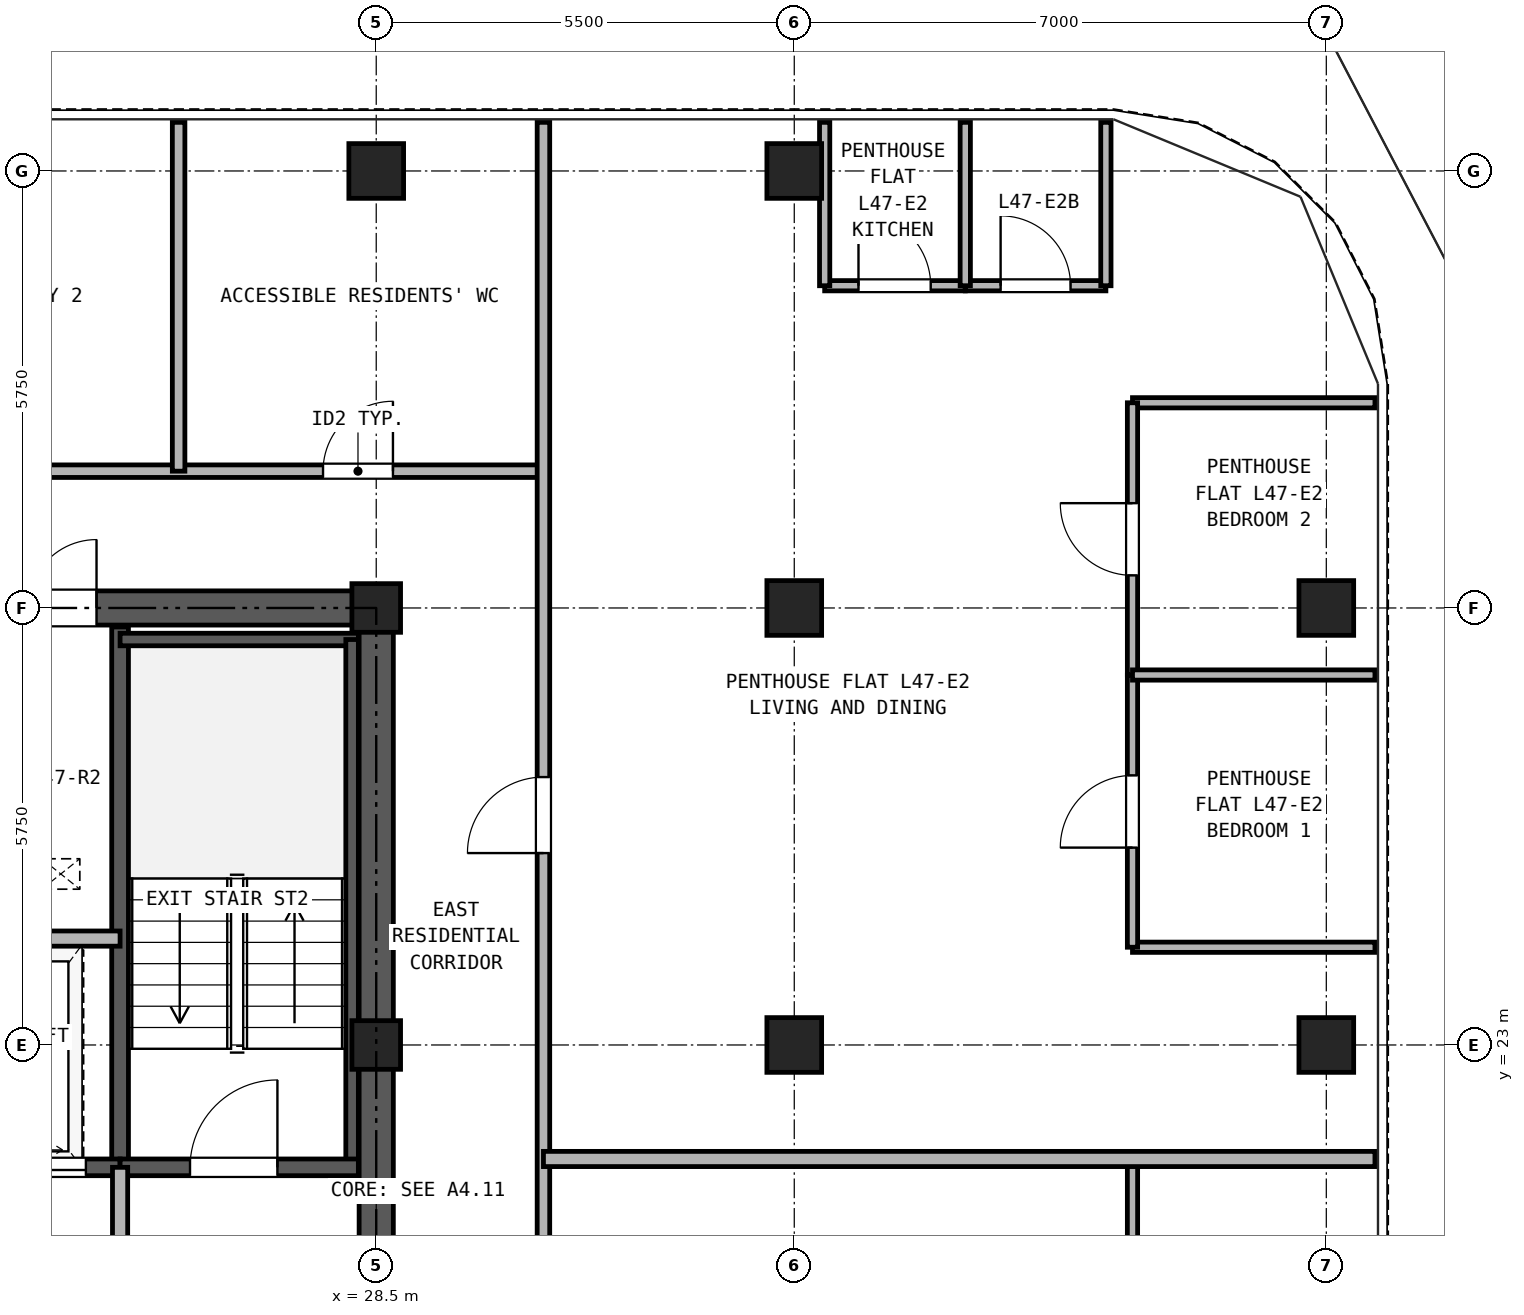
"""IFC4 building model, lengths in metres.
Left out: names, types, materials, properties, quantities, classifications, styles, units other than length and angle.
Written with IfcOpenShell. Run it as: python <this file> out.ifc"""

import sys

from ifc_helpers import new_model, si_unit, direction, frame, frame_2d, origin, origin_2d, place, context, subcontext, project, spatial, rectangle, hollow_rectangle, extrude, source, transform, mapped, element, fill, save


model = new_model("IFC4")
c1 = context("Model", 3, precision=1e-05, world=origin(), true_north=direction((0.0, 1.0)))
c2 = subcontext(c1, "Body", "Model", "MODEL_VIEW")
j1 = project(units=[si_unit("LENGTHUNIT", "METRE"), si_unit("PLANEANGLEUNIT", "RADIAN")], contexts=[c1])
p1 = place(None, origin())
s1 = spatial("IfcSite", under=j1, at=p1, CompositionType="ELEMENT")
p2 = place(p1, origin())
s2 = spatial("IfcBuilding", under=s1, at=p2, CompositionType="ELEMENT")
p3 = place(p2, frame((0.0, 0.0, 168.9)))
s3 = spatial("IfcBuildingStorey", under=s2, at=p3, CompositionType="ELEMENT", Elevation=168.9)
m1 = source(origin(), c2, "Body", "SweptSolid", [
    extrude(hollow_rectangle(XDim=0.72, YDim=0.72, WallThickness=0.04, at=origin_2d()), origin(), (0.0, 0.0, 1.0), 2.95),
])
for number, where, z_axis, x_axis in (
    (1, (28.5, 34.5, 0.0), (0.0, 0.0, 1.0), (1.0, 0.0, 0.0)),
    (2, (34.0, 34.5, 0.0), (0.0, 0.0, 1.0), (1.0, 0.0, 0.0)),
    (3, (41.0, 23.0, 0.0), (0.0, 0.0, 1.0), (1.0, 0.0, 0.0)),
    (4, (41.0, 28.75, 0.0), (0.0, 0.0, 1.0), (1.0, 0.0, 0.0)),
):
    element("IfcColumn", number, at=place(p3, frame(where, z_axis=z_axis, x_axis=x_axis)), inside=s3, PredefinedType="COLUMN", context=c2, shape_type="MappedRepresentation", body=[
        mapped(m1, transform((0.0, 0.0, 0.0), x_axis=(1.0, 0.0, 0.0), y_axis=(0.0, 1.0, 0.0), z_axis=(0.0, 0.0, 1.0), scale=1.0)),
    ])
m2 = source(origin(), c2, "Body", "SweptSolid", [
    extrude(hollow_rectangle(XDim=0.64, YDim=0.64, WallThickness=0.035, at=origin_2d()), origin(), (0.0, 0.0, 1.0), 2.95),
])
for number, where, z_axis, x_axis in (
    (5, (28.5, 23.0, 0.0), (0.0, 0.0, 1.0), (1.0, 0.0, 0.0)),
    (6, (28.5, 28.75, 0.0), (0.0, 0.0, 1.0), (1.0, 0.0, 0.0)),
):
    element("IfcColumn", number, at=place(p3, frame(where, z_axis=z_axis, x_axis=x_axis)), inside=s3, PredefinedType="COLUMN", context=c2, shape_type="MappedRepresentation", body=[
        mapped(m2, transform((0.0, 0.0, 0.0), x_axis=(1.0, 0.0, 0.0), y_axis=(0.0, 1.0, 0.0), z_axis=(0.0, 0.0, 1.0), scale=1.0)),
    ])
for number, where, z_axis, x_axis in (
    (7, (34.0, 23.0, 0.0), (0.0, 0.0, 1.0), (1.0, 0.0, 0.0)),
    (8, (34.0, 28.75, 0.0), (0.0, 0.0, 1.0), (1.0, 0.0, 0.0)),
):
    element("IfcColumn", number, at=place(p3, frame(where, z_axis=z_axis, x_axis=x_axis)), inside=s3, PredefinedType="COLUMN", context=c2, shape_type="MappedRepresentation", body=[
        mapped(m1, transform((0.0, 0.0, 0.0), x_axis=(1.0, 0.0, 0.0), y_axis=(0.0, 1.0, 0.0), z_axis=(0.0, 0.0, 1.0), scale=1.0)),
    ])
p4 = place(p3, frame((18.275, 28.75, 0.0), z_axis=(0.0, 0.0, 1.0), x_axis=(1.0, 0.0, 0.0)))
e9 = element("IfcWall", 9, at=p4, inside=s3, PredefinedType="SHEAR", context=c2, shape_type="SweptSolid", body=[
    extrude(rectangle(XDim=10.45, YDim=0.45, at=frame_2d((5.225, 0.0))), origin(), (0.0, 0.0, 1.0), 2.95),
])
p5 = place(p4, frame((4.105, 0.0, 0.0)))
e10 = element("IfcOpeningElement", 10, at=p5, cuts=e9, PredefinedType="OPENING", context=c2, shape_type="SweptSolid", body=[
    extrude(rectangle(XDim=0.9, YDim=2.05, at=frame_2d((0.45, 1.025))), frame((0.0, 0.235, 0.0), z_axis=(0.0, -1.0, 0.0), x_axis=(1.0, 0.0, 0.0)), (0.0, 0.0, 1.0), 0.47),
])
p6 = place(p4, frame((5.645, 0.0, 0.0)))
e11 = element("IfcOpeningElement", 11, at=p6, cuts=e9, PredefinedType="OPENING", context=c2, shape_type="SweptSolid", body=[
    extrude(rectangle(XDim=0.9, YDim=2.05, at=frame_2d((0.45, 1.025))), frame((0.0, 0.235, 0.0), z_axis=(0.0, -1.0, 0.0), x_axis=(1.0, 0.0, 0.0)), (0.0, 0.0, 1.0), 0.47),
])
p7 = place(p3, frame((28.5, 11.725, 0.0), z_axis=(0.0, 0.0, 1.0), x_axis=(0.0, 1.0, 0.0)))
e12 = element("IfcWall", 12, at=p7, inside=s3, PredefinedType="SHEAR", context=c2, shape_type="SweptSolid", body=[
    extrude(rectangle(XDim=16.8, YDim=0.45, at=frame_2d((8.4, 0.0))), origin(), (0.0, 0.0, 1.0), 2.95),
])
p8 = place(p7, frame((7.425, 0.0, 0.0)))
e13 = element("IfcOpeningElement", 13, at=p8, cuts=e12, PredefinedType="OPENING", context=c2, shape_type="SweptSolid", body=[
    extrude(rectangle(XDim=1.15, YDim=2.2, at=frame_2d((0.575, 1.1))), frame((0.0, 0.235, 0.0), z_axis=(0.0, -1.0, 0.0), x_axis=(1.0, 0.0, 0.0)), (0.0, 0.0, 1.0), 0.47),
])
p9 = place(p3, frame((25.13, 21.39, 0.0), z_axis=(0.0, 0.0, 1.0), x_axis=(0.0, 1.0, 0.0)))
e14 = element("IfcWall", 14, at=p9, inside=s3, PredefinedType="SOLIDWALL", context=c2, shape_type="SweptSolid", body=[
    extrude(rectangle(XDim=7.11, YDim=0.22, at=frame_2d((3.555, 0.0))), origin(), (0.0, 0.0, 1.0), 2.95),
])
p10 = place(p3, frame((25.13, 28.335, 0.0), z_axis=(0.0, 0.0, 1.0), x_axis=(1.0, 0.0, 0.0)))
e15 = element("IfcWall", 15, at=p10, inside=s3, PredefinedType="PARTITIONING", context=c2, shape_type="SweptSolid", body=[
    extrude(rectangle(XDim=3.135, YDim=0.165, at=frame_2d((1.567, 0.0))), origin(), (0.0, 0.0, 1.0), 2.95),
])
p11 = place(p3, frame((28.183, 21.39, 0.0), z_axis=(0.0, 0.0, 1.0), x_axis=(0.0, 1.0, 0.0)))
e16 = element("IfcWall", 16, at=p11, inside=s3, PredefinedType="PARTITIONING", context=c2, shape_type="SweptSolid", body=[
    extrude(rectangle(XDim=6.945, YDim=0.165, at=frame_2d((3.473, 0.0))), origin(), (0.0, 0.0, 1.0), 2.95),
])
p12 = place(p3, frame((18.735, 21.39, 0.0), z_axis=(0.0, 0.0, 1.0), x_axis=(1.0, 0.0, 0.0)))
e17 = element("IfcWall", 17, at=p12, inside=s3, PredefinedType="SOLIDWALL", context=c2, shape_type="SweptSolid", body=[
    extrude(rectangle(XDim=6.395, YDim=0.22, at=frame_2d((3.197, 0.0))), origin(), (0.0, 0.0, 1.0), 2.95),
])
p13 = place(p12, frame((1.115, 0.0, 0.0)))
e18 = element("IfcOpeningElement", 18, at=p13, cuts=e17, PredefinedType="OPENING", context=c2, shape_type="SweptSolid", body=[
    extrude(rectangle(XDim=1.15, YDim=2.2, at=frame_2d((0.575, 1.1))), frame((0.0, 0.12, 0.0), z_axis=(0.0, -1.0, 0.0), x_axis=(1.0, 0.0, 0.0)), (0.0, 0.0, 1.0), 0.24),
])
p14 = place(p12, frame((4.845, 0.0, 0.0)))
e19 = element("IfcOpeningElement", 19, at=p14, cuts=e17, PredefinedType="OPENING", context=c2, shape_type="SweptSolid", body=[
    extrude(rectangle(XDim=1.1, YDim=2.25, at=frame_2d((0.55, 1.125))), frame((0.0, 0.12, 0.0), z_axis=(0.0, -1.0, 0.0), x_axis=(1.0, 0.0, 0.0)), (0.0, 0.0, 1.0), 0.24),
])
p15 = place(p3, frame((25.13, 21.39, 0.0), z_axis=(0.0, 0.0, 1.0), x_axis=(1.0, 0.0, 0.0)))
e20 = element("IfcWall", 20, at=p15, inside=s3, PredefinedType="SOLIDWALL", context=c2, shape_type="SweptSolid", body=[
    extrude(rectangle(XDim=3.135, YDim=0.22, at=frame_2d((1.567, 0.0))), origin(), (0.0, 0.0, 1.0), 2.95),
])
p16 = place(p15, frame((0.92, 0.0, 0.0)))
e21 = element("IfcOpeningElement", 21, at=p16, cuts=e20, PredefinedType="OPENING", context=c2, shape_type="SweptSolid", body=[
    extrude(rectangle(XDim=1.15, YDim=2.2, at=frame_2d((0.575, 1.1))), frame((0.0, 0.12, 0.0), z_axis=(0.0, -1.0, 0.0), x_axis=(1.0, 0.0, 0.0)), (0.0, 0.0, 1.0), 0.24),
])
p17 = place(p3, frame((22.11, 24.4, 0.0), z_axis=(0.0, 0.0, 1.0), x_axis=(1.0, 0.0, 0.0)))
e22 = element("IfcWall", 22, at=p17, inside=s3, PredefinedType="PARTITIONING", context=c2, shape_type="SweptSolid", body=[
    extrude(rectangle(XDim=3.02, YDim=0.2, at=frame_2d((1.51, 0.0))), origin(), (0.0, 0.0, 1.0), 2.95),
])
p18 = place(p3, frame((25.13, 18.0, 0.0), z_axis=(0.0, 0.0, 1.0), x_axis=(0.0, 1.0, 0.0)))
e23 = element("IfcWall", 23, at=p18, inside=s3, PredefinedType="PARTITIONING", context=c2, shape_type="SweptSolid", body=[
    extrude(rectangle(XDim=3.39, YDim=0.2, at=frame_2d((1.695, 0.0))), origin(), (0.0, 0.0, 1.0), 2.95),
])
p19 = place(p18, frame((1.1, 0.0, 0.0)))
e24 = element("IfcOpeningElement", 24, at=p19, cuts=e23, PredefinedType="OPENING", context=c2, shape_type="SweptSolid", body=[
    extrude(rectangle(XDim=1.15, YDim=2.2, at=frame_2d((0.575, 1.1))), frame((0.0, 0.11, 0.0), z_axis=(0.0, -1.0, 0.0), x_axis=(1.0, 0.0, 0.0)), (0.0, 0.0, 1.0), 0.22),
])
p20 = place(p3, frame((16.3, 30.55, 0.0), z_axis=(0.0, 0.0, 1.0), x_axis=(1.0, 0.0, 0.0)))
e25 = element("IfcWall", 25, at=p20, inside=s3, PredefinedType="PARTITIONING", context=c2, shape_type="SweptSolid", body=[
    extrude(rectangle(XDim=14.4, YDim=0.165, at=frame_2d((7.2, 0.0))), origin(), (0.0, 0.0, 1.0), 2.95),
])
p21 = place(p20, frame((2.1, 0.0, 0.0)))
e26 = element("IfcOpeningElement", 26, at=p21, cuts=e25, PredefinedType="OPENING", context=c2, shape_type="SweptSolid", body=[
    extrude(rectangle(XDim=0.95, YDim=2.15, at=frame_2d((0.475, 1.075))), frame((0.0, 0.093, 0.0), z_axis=(0.0, -1.0, 0.0), x_axis=(1.0, 0.0, 0.0)), (0.0, 0.0, 1.0), 0.185),
])
p22 = place(p20, frame((6.9, 0.0, 0.0)))
e27 = element("IfcOpeningElement", 27, at=p22, cuts=e25, PredefinedType="OPENING", context=c2, shape_type="SweptSolid", body=[
    extrude(rectangle(XDim=0.95, YDim=2.15, at=frame_2d((0.475, 1.075))), frame((0.0, 0.093, 0.0), z_axis=(0.0, -1.0, 0.0), x_axis=(1.0, 0.0, 0.0)), (0.0, 0.0, 1.0), 0.185),
])
p23 = place(p20, frame((11.5, 0.0, 0.0)))
e28 = element("IfcOpeningElement", 28, at=p23, cuts=e25, PredefinedType="OPENING", context=c2, shape_type="SweptSolid", body=[
    extrude(rectangle(XDim=0.92, YDim=2.1, at=frame_2d((0.46, 1.05))), frame((0.0, 0.093, 0.0), z_axis=(0.0, -1.0, 0.0), x_axis=(1.0, 0.0, 0.0)), (0.0, 0.0, 1.0), 0.185),
])
p24 = place(p3, frame((30.7, 11.45, 0.0), z_axis=(0.0, 0.0, 1.0), x_axis=(0.0, 1.0, 0.0)))
e29 = element("IfcWall", 29, at=p24, inside=s3, PredefinedType="PARTITIONING", context=c2, shape_type="SweptSolid", body=[
    extrude(rectangle(XDim=23.69, YDim=0.165, at=frame_2d((11.845, 0.0))), origin(), (0.0, 0.0, 1.0), 2.95),
])
p25 = place(p24, frame((4.525, 0.0, 0.0)))
e30 = element("IfcOpeningElement", 30, at=p25, cuts=e29, PredefinedType="OPENING", context=c2, shape_type="SweptSolid", body=[
    extrude(rectangle(XDim=1.0, YDim=2.15, at=frame_2d((0.5, 1.075))), frame((0.0, 0.093, 0.0), z_axis=(0.0, -1.0, 0.0), x_axis=(1.0, 0.0, 0.0)), (0.0, 0.0, 1.0), 0.185),
])
p26 = place(p24, frame((14.075, 0.0, 0.0)))
e31 = element("IfcOpeningElement", 31, at=p26, cuts=e29, PredefinedType="OPENING", context=c2, shape_type="SweptSolid", body=[
    extrude(rectangle(XDim=1.0, YDim=2.15, at=frame_2d((0.5, 1.075))), frame((0.0, 0.093, 0.0), z_axis=(0.0, -1.0, 0.0), x_axis=(1.0, 0.0, 0.0)), (0.0, 0.0, 1.0), 0.185),
])
p27 = place(p3, frame((38.45, 18.1, 0.0), z_axis=(0.0, 0.0, 1.0), x_axis=(0.0, 1.0, 0.0)))
e32 = element("IfcWall", 32, at=p27, inside=s3, PredefinedType="PARTITIONING", context=c2, shape_type="SweptSolid", body=[
    extrude(rectangle(XDim=3.4, YDim=0.135, at=frame_2d((1.7, 0.0))), origin(), (0.0, 0.0, 1.0), 2.95),
])
p28 = place(p27, frame((1.22, 0.0, 0.0)))
e33 = element("IfcOpeningElement", 33, at=p28, cuts=e32, PredefinedType="OPENING", context=c2, shape_type="SweptSolid", body=[
    extrude(rectangle(XDim=0.95, YDim=2.15, at=frame_2d((0.475, 1.075))), frame((0.0, 0.077, 0.0), z_axis=(0.0, -1.0, 0.0), x_axis=(1.0, 0.0, 0.0)), (0.0, 0.0, 1.0), 0.155),
])
p29 = place(p3, frame((30.7, 21.5, 0.0), z_axis=(0.0, 0.0, 1.0), x_axis=(1.0, 0.0, 0.0)))
e34 = element("IfcWall", 34, at=p29, inside=s3, PredefinedType="PARTITIONING", context=c2, shape_type="SweptSolid", body=[
    extrude(rectangle(XDim=10.94, YDim=0.2, at=frame_2d((5.47, 0.0))), origin(), (0.0, 0.0, 1.0), 2.95),
])
p30 = place(p3, frame((34.4, 32.99, 0.0), z_axis=(0.0, 0.0, 1.0), x_axis=(1.0, 0.0, 0.0)))
e35 = element("IfcWall", 35, at=p30, inside=s3, PredefinedType="PARTITIONING", context=c2, shape_type="SweptSolid", body=[
    extrude(rectangle(XDim=1.85, YDim=0.135, at=frame_2d((0.925, 0.0))), origin(), (0.0, 0.0, 1.0), 2.95),
])
p31 = place(p30, frame((0.445, 0.0, 0.0)))
e36 = element("IfcOpeningElement", 36, at=p31, cuts=e35, PredefinedType="OPENING", context=c2, shape_type="SweptSolid", body=[
    extrude(rectangle(XDim=0.95, YDim=2.15, at=frame_2d((0.475, 1.075))), frame((0.0, 0.077, 0.0), z_axis=(0.0, -1.0, 0.0), x_axis=(1.0, 0.0, 0.0)), (0.0, 0.0, 1.0), 0.155),
])
p32 = place(p3, frame((36.25, 32.99, 0.0), z_axis=(0.0, 0.0, 1.0), x_axis=(1.0, 0.0, 0.0)))
e37 = element("IfcWall", 37, at=p32, inside=s3, PredefinedType="PARTITIONING", context=c2, shape_type="SweptSolid", body=[
    extrude(rectangle(XDim=1.85, YDim=0.135, at=frame_2d((0.925, 0.0))), origin(), (0.0, 0.0, 1.0), 2.95),
])
p33 = place(p32, frame((0.465, 0.0, 0.0)))
e38 = element("IfcOpeningElement", 38, at=p33, cuts=e37, PredefinedType="OPENING", context=c2, shape_type="SweptSolid", body=[
    extrude(rectangle(XDim=0.92, YDim=2.1, at=frame_2d((0.46, 1.05))), frame((0.0, 0.077, 0.0), z_axis=(0.0, -1.0, 0.0), x_axis=(1.0, 0.0, 0.0)), (0.0, 0.0, 1.0), 0.155),
])
for number, where, z_axis, x_axis in (
    (39, (34.4, 32.99, 0.0), (0.0, 0.0, 1.0), (0.0, 1.0, 0.0)),
    (40, (36.25, 32.99, 0.0), (0.0, 0.0, 1.0), (0.0, 1.0, 0.0)),
    (41, (38.1, 32.99, 0.0), (0.0, 0.0, 1.0), (0.0, 1.0, 0.0)),
):
    element("IfcWall", number, at=place(p3, frame(where, z_axis=z_axis, x_axis=x_axis)), inside=s3, PredefinedType="PARTITIONING", context=c2, shape_type="SweptSolid", body=[
        extrude(rectangle(XDim=2.15, YDim=0.135, at=frame_2d((1.075, 0.0))), origin(), (0.0, 0.0, 1.0), 2.95),
    ])
for number, where, z_axis, x_axis in (
    (42, (38.45, 24.286, 0.0), (0.0, 0.0, 1.0), (1.0, 0.0, 0.0)),
    (43, (38.45, 31.45, 0.0), (0.0, 0.0, 1.0), (1.0, 0.0, 0.0)),
):
    element("IfcWall", number, at=place(p3, frame(where, z_axis=z_axis, x_axis=x_axis)), inside=s3, PredefinedType="PARTITIONING", context=c2, shape_type="SweptSolid", body=[
        extrude(rectangle(XDim=3.19, YDim=0.135, at=frame_2d((1.595, 0.0))), origin(), (0.0, 0.0, 1.0), 2.95),
    ])
p34 = place(p3, frame((38.45, 24.286, 0.0), z_axis=(0.0, 0.0, 1.0), x_axis=(0.0, 1.0, 0.0)))
e44 = element("IfcWall", 44, at=p34, inside=s3, PredefinedType="PARTITIONING", context=c2, shape_type="SweptSolid", body=[
    extrude(rectangle(XDim=3.582, YDim=0.135, at=frame_2d((1.791, 0.0))), origin(), (0.0, 0.0, 1.0), 2.95),
])
p35 = place(p34, frame((1.311, 0.0, 0.0)))
e45 = element("IfcOpeningElement", 45, at=p35, cuts=e44, PredefinedType="OPENING", context=c2, shape_type="SweptSolid", body=[
    extrude(rectangle(XDim=0.95, YDim=2.15, at=frame_2d((0.475, 1.075))), frame((0.0, 0.077, 0.0), z_axis=(0.0, -1.0, 0.0), x_axis=(1.0, 0.0, 0.0)), (0.0, 0.0, 1.0), 0.155),
])
p36 = place(p3, frame((38.45, 27.868, 0.0), z_axis=(0.0, 0.0, 1.0), x_axis=(0.0, 1.0, 0.0)))
e46 = element("IfcWall", 46, at=p36, inside=s3, PredefinedType="PARTITIONING", context=c2, shape_type="SweptSolid", body=[
    extrude(rectangle(XDim=3.582, YDim=0.135, at=frame_2d((1.791, 0.0))), origin(), (0.0, 0.0, 1.0), 2.95),
])
p37 = place(p36, frame((1.311, 0.0, 0.0)))
e47 = element("IfcOpeningElement", 47, at=p37, cuts=e46, PredefinedType="OPENING", context=c2, shape_type="SweptSolid", body=[
    extrude(rectangle(XDim=0.95, YDim=2.15, at=frame_2d((0.475, 1.075))), frame((0.0, 0.077, 0.0), z_axis=(0.0, -1.0, 0.0), x_axis=(1.0, 0.0, 0.0)), (0.0, 0.0, 1.0), 0.155),
])
p38 = place(p3, frame((38.45, 27.868, 0.0), z_axis=(0.0, 0.0, 1.0), x_axis=(1.0, 0.0, 0.0)))
e48 = element("IfcWall", 48, at=p38, inside=s3, PredefinedType="PARTITIONING", context=c2, shape_type="SweptSolid", body=[
    extrude(rectangle(XDim=3.19, YDim=0.135, at=frame_2d((1.595, 0.0))), origin(), (0.0, 0.0, 1.0), 2.95),
])
p39 = place(p3, frame((25.9, 30.55, 0.0), z_axis=(0.0, 0.0, 1.0), x_axis=(0.0, 1.0, 0.0)))
e49 = element("IfcWall", 49, at=p39, inside=s3, PredefinedType="PARTITIONING", context=c2, shape_type="SweptSolid", body=[
    extrude(rectangle(XDim=4.59, YDim=0.165, at=frame_2d((2.295, 0.0))), origin(), (0.0, 0.0, 1.0), 2.95),
])
p40 = place(p16, frame((1.15, 0.0, 0.0), z_axis=(0.0, 0.0, 1.0), x_axis=(-1.0, 0.0, 0.0)))
e50 = element("IfcDoor", 50, at=p40, inside=s3, OperationType="SINGLE_SWING_RIGHT", PredefinedType="DOOR", context=c2, shape_type="SweptSolid", body=[
    extrude(rectangle(XDim=1.15, YDim=2.2, at=frame_2d((0.575, 1.1))), frame((0.0, 0.025, 0.0), z_axis=(0.0, -1.0, 0.0), x_axis=(1.0, 0.0, 0.0)), (0.0, 0.0, 1.0), 0.05),
])
fill(e21, e50)
p41 = place(p14, frame((1.1, 0.0, 0.0), z_axis=(0.0, 0.0, 1.0), x_axis=(-1.0, 0.0, 0.0)))
e51 = element("IfcDoor", 51, at=p41, inside=s3, OperationType="DOUBLE_DOOR_SLIDING", PredefinedType="DOOR", context=c2, shape_type="SweptSolid", body=[
    extrude(rectangle(XDim=1.1, YDim=2.25, at=frame_2d((0.55, 1.125))), frame((0.0, 0.025, 0.0), z_axis=(0.0, -1.0, 0.0), x_axis=(1.0, 0.0, 0.0)), (0.0, 0.0, 1.0), 0.05),
])
fill(e19, e51)
p42 = place(p6, origin())
e52 = element("IfcDoor", 52, at=p42, inside=s3, OperationType="SINGLE_SWING_RIGHT", PredefinedType="DOOR", context=c2, shape_type="SweptSolid", body=[
    extrude(rectangle(XDim=0.9, YDim=2.05, at=frame_2d((0.45, 1.025))), frame((0.0, 0.025, 0.0), z_axis=(0.0, -1.0, 0.0), x_axis=(1.0, 0.0, 0.0)), (0.0, 0.0, 1.0), 0.05),
])
fill(e11, e52)
p43 = place(p31, frame((0.95, 0.0, 0.0), z_axis=(0.0, 0.0, 1.0), x_axis=(-1.0, 0.0, 0.0)))
e53 = element("IfcDoor", 53, at=p43, inside=s3, OperationType="SINGLE_SWING_LEFT", PredefinedType="DOOR", context=c2, shape_type="SweptSolid", body=[
    extrude(rectangle(XDim=0.95, YDim=2.15, at=frame_2d((0.475, 1.075))), frame((0.0, 0.025, 0.0), z_axis=(0.0, -1.0, 0.0), x_axis=(1.0, 0.0, 0.0)), (0.0, 0.0, 1.0), 0.05),
])
fill(e36, e53)
p44 = place(p33, frame((0.92, 0.0, 0.0), z_axis=(0.0, 0.0, 1.0), x_axis=(-1.0, 0.0, 0.0)))
e54 = element("IfcDoor", 54, at=p44, inside=s3, OperationType="SINGLE_SWING_LEFT", PredefinedType="DOOR", context=c2, shape_type="SweptSolid", body=[
    extrude(rectangle(XDim=0.92, YDim=2.1, at=frame_2d((0.46, 1.05))), frame((0.0, 0.025, 0.0), z_axis=(0.0, -1.0, 0.0), x_axis=(1.0, 0.0, 0.0)), (0.0, 0.0, 1.0), 0.05),
])
fill(e38, e54)
p45 = place(p35, frame((0.95, 0.0, 0.0), z_axis=(0.0, 0.0, 1.0), x_axis=(-1.0, 0.0, 0.0)))
e55 = element("IfcDoor", 55, at=p45, inside=s3, OperationType="SINGLE_SWING_LEFT", PredefinedType="DOOR", context=c2, shape_type="SweptSolid", body=[
    extrude(rectangle(XDim=0.95, YDim=2.15, at=frame_2d((0.475, 1.075))), frame((0.0, 0.025, 0.0), z_axis=(0.0, -1.0, 0.0), x_axis=(1.0, 0.0, 0.0)), (0.0, 0.0, 1.0), 0.05),
])
fill(e45, e55)
p46 = place(p37, frame((0.95, 0.0, 0.0), z_axis=(0.0, 0.0, 1.0), x_axis=(-1.0, 0.0, 0.0)))
e56 = element("IfcDoor", 56, at=p46, inside=s3, OperationType="SINGLE_SWING_RIGHT", PredefinedType="DOOR", context=c2, shape_type="SweptSolid", body=[
    extrude(rectangle(XDim=0.95, YDim=2.15, at=frame_2d((0.475, 1.075))), frame((0.0, 0.025, 0.0), z_axis=(0.0, -1.0, 0.0), x_axis=(1.0, 0.0, 0.0)), (0.0, 0.0, 1.0), 0.05),
])
fill(e47, e56)
p47 = place(p26, frame((1.0, 0.0, 0.0), z_axis=(0.0, 0.0, 1.0), x_axis=(-1.0, 0.0, 0.0)))
e57 = element("IfcDoor", 57, at=p47, inside=s3, OperationType="SINGLE_SWING_LEFT", PredefinedType="DOOR", context=c2, shape_type="SweptSolid", body=[
    extrude(rectangle(XDim=1.0, YDim=2.15, at=frame_2d((0.5, 1.075))), frame((0.0, 0.025, 0.0), z_axis=(0.0, -1.0, 0.0), x_axis=(1.0, 0.0, 0.0)), (0.0, 0.0, 1.0), 0.05),
])
fill(e31, e57)
p48 = place(p23, origin())
e58 = element("IfcDoor", 58, at=p48, inside=s3, OperationType="SINGLE_SWING_RIGHT", PredefinedType="DOOR", context=c2, shape_type="SweptSolid", body=[
    extrude(rectangle(XDim=0.92, YDim=2.1, at=frame_2d((0.46, 1.05))), frame((0.0, 0.025, 0.0), z_axis=(0.0, -1.0, 0.0), x_axis=(1.0, 0.0, 0.0)), (0.0, 0.0, 1.0), 0.05),
])
fill(e28, e58)
save(model, sys.argv[1])
